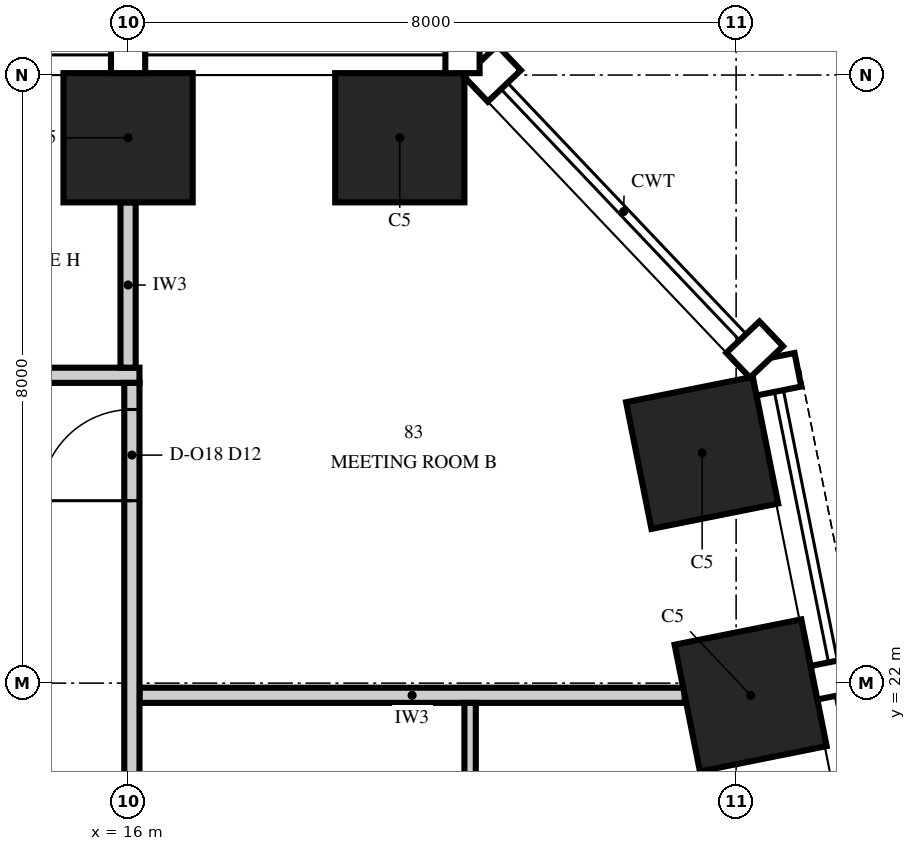
"""IFC4 building model, lengths in metres.
Left out: names, types, materials, properties, quantities, classifications, styles, units other than length and angle.
Written with IfcOpenShell. Run it as: python <this file> out.ifc"""

import sys

from ifc_helpers import new_model, si_unit, direction, frame, frame_2d, origin, origin_2d, place, context, subcontext, project, spatial, rectangle, extrude, element, fill, save


model = new_model("IFC4")
c1 = context("Model", 3, precision=1e-05, world=origin(), true_north=direction((0.0, 1.0)))
c2 = subcontext(c1, "Body", "Model", "MODEL_VIEW")
j1 = project(units=[si_unit("LENGTHUNIT", "METRE"), si_unit("PLANEANGLEUNIT", "RADIAN")], contexts=[c1])
p1 = place(None, origin())
s1 = spatial("IfcSite", under=j1, at=p1, CompositionType="ELEMENT")
p2 = place(p1, origin())
s2 = spatial("IfcBuilding", under=s1, at=p2, CompositionType="ELEMENT")
p3 = place(p2, frame((0.0, 0.0, 312.0)))
s3 = spatial("IfcBuildingStorey", under=s2, at=p3, CompositionType="ELEMENT", Elevation=312.0)
for number, where, z_axis, x_axis in (
    (1, (24.191, 21.838, 0.0), (0.0, 0.0, 1.0), (-0.196, 0.981, 0.0)),
    (2, (23.553, 25.029, 0.0), (0.0, 0.0, 1.0), (-0.196, 0.981, 0.0)),
    (3, (19.575, 29.175, 0.0), (0.0, 0.0, 1.0), (-1.0, 0.0, 0.0)),
    (4, (16.0, 29.175, 0.0), (0.0, 0.0, 1.0), (-1.0, 0.0, 0.0)),
):
    element("IfcColumn", number, at=place(p3, frame(where, z_axis=z_axis, x_axis=x_axis)), inside=s3, PredefinedType="COLUMN", context=c2, shape_type="SweptSolid", body=[
        extrude(rectangle(XDim=1.7, YDim=1.7, at=origin_2d()), origin(), (0.0, 0.0, 1.0), 4.0),
    ])
p4 = place(p3, frame((16.15, 21.84, 0.0), z_axis=(0.0, 0.0, 1.0), x_axis=(1.0, 0.0, 0.0)))
e5 = element("IfcWall", 5, at=p4, inside=s3, PredefinedType="PARTITIONING", context=c2, shape_type="SweptSolid", body=[
    extrude(rectangle(XDim=7.174, YDim=0.2, at=frame_2d((3.587, 0.0))), origin(), (0.0, 0.0, 1.0), 3.23),
])
p5 = place(p3, frame((-16.15, 26.05, 0.0), z_axis=(0.0, 0.0, 1.0), x_axis=(1.0, 0.0, 0.0)))
e6 = element("IfcWall", 6, at=p5, inside=s3, PredefinedType="PARTITIONING", context=c2, shape_type="SweptSolid", body=[
    extrude(rectangle(XDim=32.3, YDim=0.2, at=frame_2d((16.15, 0.0))), origin(), (0.0, 0.0, 1.0), 3.418),
])
p6 = place(p5, frame((1.55, 0.0, 0.0)))
e7 = element("IfcOpeningElement", 7, at=p6, cuts=e6, PredefinedType="OPENING", context=c2, shape_type="SweptSolid", body=[
    extrude(rectangle(XDim=1.2, YDim=2.4, at=frame_2d((0.6, 1.2))), frame((0.0, 0.115, 0.0), z_axis=(0.0, -1.0, 0.0), x_axis=(1.0, 0.0, 0.0)), (0.0, 0.0, 1.0), 0.23),
])
p7 = place(p5, frame((5.55, 0.0, 0.0)))
e8 = element("IfcOpeningElement", 8, at=p7, cuts=e6, PredefinedType="OPENING", context=c2, shape_type="SweptSolid", body=[
    extrude(rectangle(XDim=1.2, YDim=2.4, at=frame_2d((0.6, 1.2))), frame((0.0, 0.115, 0.0), z_axis=(0.0, -1.0, 0.0), x_axis=(1.0, 0.0, 0.0)), (0.0, 0.0, 1.0), 0.23),
])
p8 = place(p5, frame((9.55, 0.0, 0.0)))
e9 = element("IfcOpeningElement", 9, at=p8, cuts=e6, PredefinedType="OPENING", context=c2, shape_type="SweptSolid", body=[
    extrude(rectangle(XDim=1.2, YDim=2.4, at=frame_2d((0.6, 1.2))), frame((0.0, 0.115, 0.0), z_axis=(0.0, -1.0, 0.0), x_axis=(1.0, 0.0, 0.0)), (0.0, 0.0, 1.0), 0.23),
])
p9 = place(p5, frame((13.55, 0.0, 0.0)))
e10 = element("IfcOpeningElement", 10, at=p9, cuts=e6, PredefinedType="OPENING", context=c2, shape_type="SweptSolid", body=[
    extrude(rectangle(XDim=1.2, YDim=2.4, at=frame_2d((0.6, 1.2))), frame((0.0, 0.115, 0.0), z_axis=(0.0, -1.0, 0.0), x_axis=(1.0, 0.0, 0.0)), (0.0, 0.0, 1.0), 0.23),
])
p10 = place(p5, frame((17.55, 0.0, 0.0)))
e11 = element("IfcOpeningElement", 11, at=p10, cuts=e6, PredefinedType="OPENING", context=c2, shape_type="SweptSolid", body=[
    extrude(rectangle(XDim=1.2, YDim=2.4, at=frame_2d((0.6, 1.2))), frame((0.0, 0.115, 0.0), z_axis=(0.0, -1.0, 0.0), x_axis=(1.0, 0.0, 0.0)), (0.0, 0.0, 1.0), 0.23),
])
p11 = place(p5, frame((21.55, 0.0, 0.0)))
e12 = element("IfcOpeningElement", 12, at=p11, cuts=e6, PredefinedType="OPENING", context=c2, shape_type="SweptSolid", body=[
    extrude(rectangle(XDim=1.2, YDim=2.4, at=frame_2d((0.6, 1.2))), frame((0.0, 0.115, 0.0), z_axis=(0.0, -1.0, 0.0), x_axis=(1.0, 0.0, 0.0)), (0.0, 0.0, 1.0), 0.23),
])
p12 = place(p5, frame((25.55, 0.0, 0.0)))
e13 = element("IfcOpeningElement", 13, at=p12, cuts=e6, PredefinedType="OPENING", context=c2, shape_type="SweptSolid", body=[
    extrude(rectangle(XDim=1.2, YDim=2.4, at=frame_2d((0.6, 1.2))), frame((0.0, 0.115, 0.0), z_axis=(0.0, -1.0, 0.0), x_axis=(1.0, 0.0, 0.0)), (0.0, 0.0, 1.0), 0.23),
])
p13 = place(p5, frame((29.55, 0.0, 0.0)))
e14 = element("IfcOpeningElement", 14, at=p13, cuts=e6, PredefinedType="OPENING", context=c2, shape_type="SweptSolid", body=[
    extrude(rectangle(XDim=1.2, YDim=2.4, at=frame_2d((0.6, 1.2))), frame((0.0, 0.115, 0.0), z_axis=(0.0, -1.0, 0.0), x_axis=(1.0, 0.0, 0.0)), (0.0, 0.0, 1.0), 0.23),
])
p14 = place(p3, frame((16.0, 26.15, 0.0), z_axis=(0.0, 0.0, 1.0), x_axis=(0.0, 1.0, 0.0)))
e15 = element("IfcWall", 15, at=p14, inside=s3, PredefinedType="PARTITIONING", context=c2, shape_type="SweptSolid", body=[
    extrude(rectangle(XDim=2.175, YDim=0.2, at=frame_2d((1.087, 0.0))), origin(), (0.0, 0.0, 1.0), 3.418),
])
p15 = place(p3, frame((16.05, 9.9, 0.0), z_axis=(0.0, 0.0, 1.0), x_axis=(0.0, 1.0, 0.0)))
e16 = element("IfcWall", 16, at=p15, inside=s3, PredefinedType="PARTITIONING", context=c2, shape_type="SweptSolid", body=[
    extrude(rectangle(XDim=16.05, YDim=0.2, at=frame_2d((8.025, 0.0))), origin(), (0.0, 0.0, 1.0), 3.23),
])
p16 = place(p15, frame((14.5, 0.0, 0.0)))
e17 = element("IfcOpeningElement", 17, at=p16, cuts=e16, PredefinedType="OPENING", context=c2, shape_type="SweptSolid", body=[
    extrude(rectangle(XDim=1.2, YDim=2.4, at=frame_2d((0.6, 1.2))), frame((0.0, 0.115, 0.0), z_axis=(0.0, -1.0, 0.0), x_axis=(1.0, 0.0, 0.0)), (0.0, 0.0, 1.0), 0.23),
])
p17 = place(p15, frame((7.85, 0.0, 0.0)))
e18 = element("IfcOpeningElement", 18, at=p17, cuts=e16, PredefinedType="OPENING", context=c2, shape_type="SweptSolid", body=[
    extrude(rectangle(XDim=1.2, YDim=2.4, at=frame_2d((0.6, 1.2))), frame((0.0, 0.115, 0.0), z_axis=(0.0, -1.0, 0.0), x_axis=(1.0, 0.0, 0.0)), (0.0, 0.0, 1.0), 0.23),
])
p18 = place(p3, frame((20.5, 17.915, 0.0), z_axis=(0.0, 0.0, 1.0), x_axis=(0.0, 1.0, 0.0)))
e19 = element("IfcWall", 19, at=p18, inside=s3, PredefinedType="PARTITIONING", context=c2, shape_type="SweptSolid", body=[
    extrude(rectangle(XDim=3.825, YDim=0.15, at=frame_2d((1.913, 0.0))), origin(), (0.0, 0.0, 1.0), 3.23),
])
p19 = place(p18, frame((1.425, 0.0, 0.0)))
e20 = element("IfcOpeningElement", 20, at=p19, cuts=e19, PredefinedType="OPENING", context=c2, shape_type="SweptSolid", body=[
    extrude(rectangle(XDim=1.0, YDim=2.3, at=frame_2d((0.5, 1.15))), frame((0.0, 0.09, 0.0), z_axis=(0.0, -1.0, 0.0), x_axis=(1.0, 0.0, 0.0)), (0.0, 0.0, 1.0), 0.18),
])
p20 = place(p16, origin())
e21 = element("IfcDoor", 21, at=p20, inside=s3, OperationType="SINGLE_SWING_LEFT", PredefinedType="DOOR", context=c2, shape_type="SweptSolid", body=[
    extrude(rectangle(XDim=1.2, YDim=2.4, at=frame_2d((0.6, 1.2))), frame((0.0, 0.1, 0.0), z_axis=(0.0, -1.0, 0.0), x_axis=(1.0, 0.0, 0.0)), (0.0, 0.0, 1.0), 0.199),
])
fill(e17, e21)
save(model, sys.argv[1])
